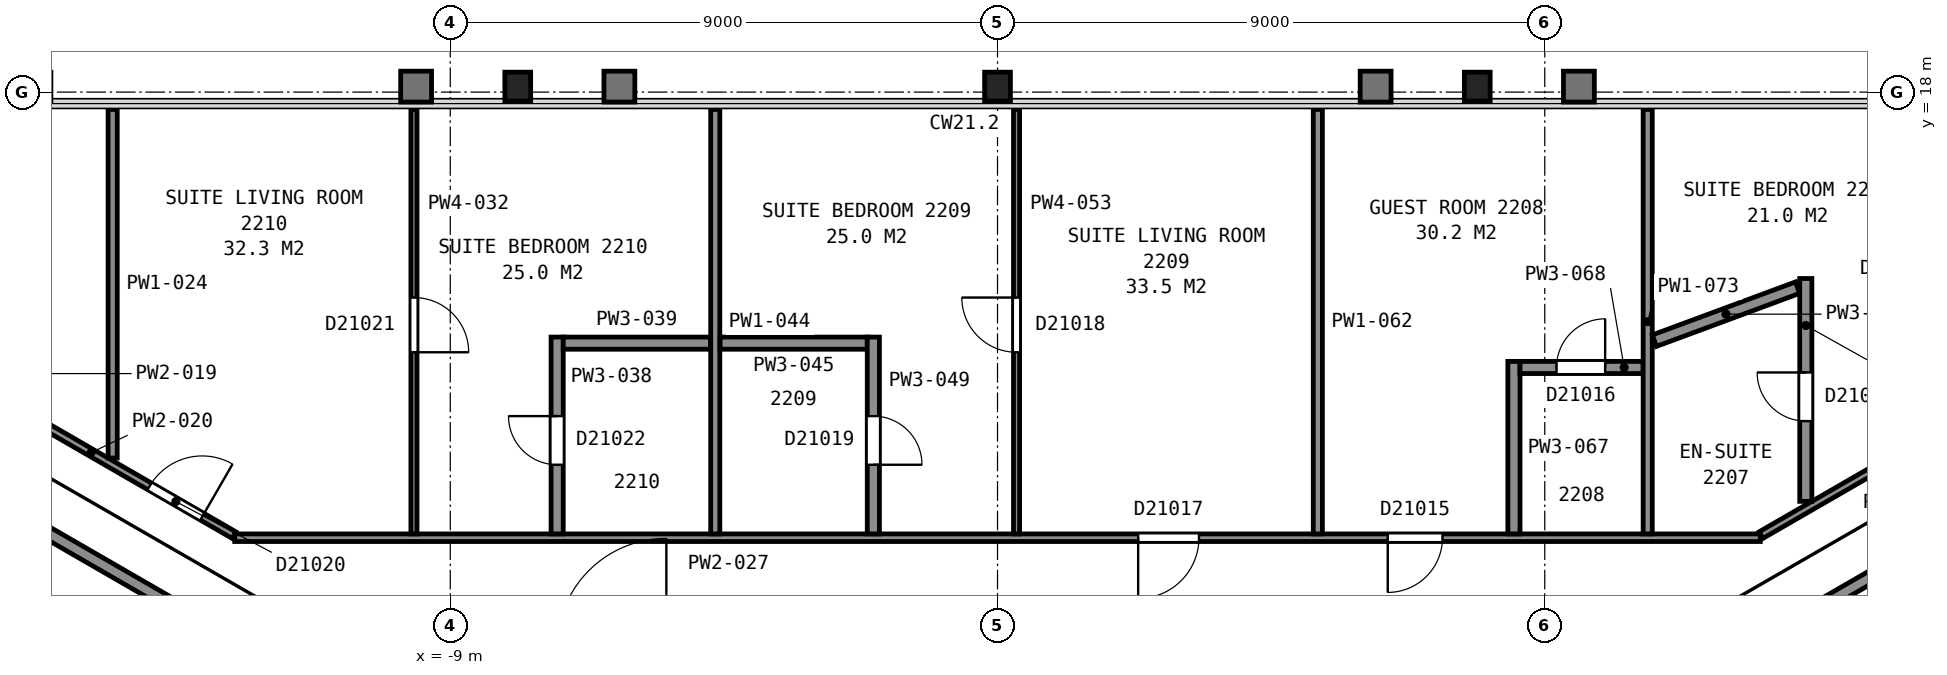
"""IFC4 building model, lengths in metres.
Left out: names, types, materials, properties, quantities, classifications, styles, units other than length and angle.
Written with IfcOpenShell. Run it as: python <this file> out.ifc"""

import sys

from ifc_helpers import new_model, si_unit, direction, frame, frame_2d, origin, origin_2d, place, context, subcontext, project, spatial, rectangle, i_section, extrude, element, fill, save


model = new_model("IFC4")
c1 = context("Model", 3, precision=1e-05, world=origin(), true_north=direction((0.0, 1.0)))
c2 = subcontext(c1, "Body", "Model", "MODEL_VIEW")
j1 = project(units=[si_unit("LENGTHUNIT", "METRE"), si_unit("PLANEANGLEUNIT", "RADIAN")], contexts=[c1])
p1 = place(None, origin())
s1 = spatial("IfcSite", under=j1, at=p1, CompositionType="ELEMENT")
p2 = place(p1, origin())
s2 = spatial("IfcBuilding", under=s1, at=p2, CompositionType="ELEMENT")
p3 = place(p2, frame((0.0, 0.0, 96.4)))
s3 = spatial("IfcBuildingStorey", under=s2, at=p3, CompositionType="ELEMENT", Elevation=96.4)
p4 = place(p3, frame((7.89, 18.09, 0.0), z_axis=(0.0, 0.0, 1.0), x_axis=(1.0, 0.0, 0.0)))
e1 = element("IfcColumn", 1, at=p4, inside=s3, PredefinedType="COLUMN", context=c2, shape_type="SweptSolid", body=[
    extrude(i_section(OverallWidth=0.424, OverallDepth=0.475, WebThickness=0.048, FlangeThickness=0.077, FilletRadius=0.015, at=origin_2d()), origin(), (0.0, 0.0, 1.0), 3.56),
])
p5 = place(p3, frame((0.0, 18.09, 0.0), z_axis=(0.0, 0.0, 1.0), x_axis=(1.0, 0.0, 0.0)))
e2 = element("IfcColumn", 2, at=p5, inside=s3, PredefinedType="COLUMN", context=c2, shape_type="SweptSolid", body=[
    extrude(i_section(OverallWidth=0.424, OverallDepth=0.475, WebThickness=0.048, FlangeThickness=0.077, FilletRadius=0.015, at=origin_2d()), origin(), (0.0, 0.0, 1.0), 3.565),
])
p6 = place(p3, frame((-7.89, 18.09, 0.0), z_axis=(0.0, 0.0, 1.0), x_axis=(1.0, 0.0, 0.0)))
e3 = element("IfcColumn", 3, at=p6, inside=s3, PredefinedType="COLUMN", context=c2, shape_type="SweptSolid", body=[
    extrude(i_section(OverallWidth=0.424, OverallDepth=0.475, WebThickness=0.048, FlangeThickness=0.077, FilletRadius=0.015, at=origin_2d()), origin(), (0.0, 0.0, 1.0), 3.56),
])
for number, where, z_axis, x_axis in (
    (4, (6.178, 5.299, 0.0), (0.0, 0.0, 1.0), (0.866, 0.5, 0.0)),
    (5, (-6.178, 5.299, 0.0), (0.0, 0.0, 1.0), (-0.866, 0.5, 0.0)),
):
    element("IfcWall", number, at=place(p3, frame(where, z_axis=z_axis, x_axis=x_axis)), inside=s3, PredefinedType="PARTITIONING", context=c2, shape_type="SweptSolid", body=[
        extrude(rectangle(XDim=12.0, YDim=0.2, at=frame_2d((6.0, 0.0))), origin(), (0.0, 0.0, 1.0), 3.35),
    ])
p7 = place(p3, frame((-15.867, 12.625, 0.0), z_axis=(0.0, 0.0, 1.0), x_axis=(0.86603035395, -0.499991425964, 0.0)))
e6 = element("IfcWall", 6, at=p7, inside=s3, PredefinedType="PARTITIONING", context=c2, shape_type="SweptSolid", body=[
    extrude(rectangle(XDim=3.824, YDim=0.125, at=frame_2d((1.912, 0.0))), origin(), (0.0, 0.0, 1.0), 2.613),
])
p8 = place(p7, frame((2.219, 0.0, 0.0)))
e7 = element("IfcOpeningElement", 7, at=p8, cuts=e6, PredefinedType="OPENING", context=c2, shape_type="SweptSolid", body=[
    extrude(rectangle(XDim=1.0, YDim=2.1, at=frame_2d((0.5, 1.05))), frame((0.0, 0.073, 0.0), z_axis=(0.0, -1.0, 0.0), x_axis=(1.0, 0.0, 0.0)), (0.0, 0.0, 1.0), 0.145),
])
p9 = place(p3, frame((-14.552, 11.981, 0.0), z_axis=(0.0, 0.0, 1.0), x_axis=(0.0, 1.0, 0.0)))
e8 = element("IfcWall", 8, at=p9, inside=s3, PredefinedType="PARTITIONING", context=c2, shape_type="SweptSolid", body=[
    extrude(rectangle(XDim=5.734, YDim=0.15, at=frame_2d((2.867, 0.0))), origin(), (0.0, 0.0, 1.0), 2.613),
])
p10 = place(p3, frame((-12.544, 10.671, 0.0), z_axis=(0.0, 0.0, 1.0), x_axis=(1.0, 0.0, 0.0)))
e9 = element("IfcWall", 9, at=p10, inside=s3, PredefinedType="PARTITIONING", context=c2, shape_type="SweptSolid", body=[
    extrude(rectangle(XDim=25.089, YDim=0.125, at=frame_2d((12.544, 0.0))), origin(), (0.0, 0.0, 1.0), 2.613),
])
p11 = place(p10, frame((18.962, 0.0, 0.0)))
e10 = element("IfcOpeningElement", 10, at=p11, cuts=e9, PredefinedType="OPENING", context=c2, shape_type="SweptSolid", body=[
    extrude(rectangle(XDim=0.9, YDim=2.1, at=frame_2d((0.45, 1.05))), frame((0.0, 0.073, 0.0), z_axis=(0.0, -1.0, 0.0), x_axis=(1.0, 0.0, 0.0)), (0.0, 0.0, 1.0), 0.145),
])
p12 = place(p10, frame((14.857, 0.0, 0.0)))
e11 = element("IfcOpeningElement", 11, at=p12, cuts=e9, PredefinedType="OPENING", context=c2, shape_type="SweptSolid", body=[
    extrude(rectangle(XDim=1.0, YDim=2.1, at=frame_2d((0.5, 1.05))), frame((0.0, 0.073, 0.0), z_axis=(0.0, -1.0, 0.0), x_axis=(1.0, 0.0, 0.0)), (0.0, 0.0, 1.0), 0.145),
])
p13 = place(p3, frame((-9.597, 17.715, 0.0), z_axis=(0.0, 0.0, 1.0), x_axis=(0.0, -1.0, 0.0)))
e12 = element("IfcWall", 12, at=p13, inside=s3, PredefinedType="PARTITIONING", context=c2, shape_type="SweptSolid", body=[
    extrude(rectangle(XDim=6.982, YDim=0.1, at=frame_2d((3.491, 0.0))), origin(), (0.0, 0.0, 1.0), 2.613),
])
p14 = place(p13, frame((3.094, 0.0, 0.0)))
e13 = element("IfcOpeningElement", 13, at=p14, cuts=e12, PredefinedType="OPENING", context=c2, shape_type="SweptSolid", body=[
    extrude(rectangle(XDim=0.9, YDim=2.1, at=frame_2d((0.45, 1.05))), frame((0.0, 0.06, 0.0), z_axis=(0.0, -1.0, 0.0), x_axis=(1.0, 0.0, 0.0)), (0.0, 0.0, 1.0), 0.12),
])
p15 = place(p3, frame((-7.242, 13.971, 0.0), z_axis=(0.0, 0.0, 1.0), x_axis=(0.0, -1.0, 0.0)))
e14 = element("IfcWall", 14, at=p15, inside=s3, PredefinedType="PARTITIONING", context=c2, shape_type="SweptSolid", body=[
    extrude(rectangle(XDim=3.238, YDim=0.2, at=frame_2d((1.619, 0.0))), origin(), (0.0, 0.0, 1.0), 2.613),
])
p16 = place(p15, frame((1.3, 0.0, 0.0)))
e15 = element("IfcOpeningElement", 15, at=p16, cuts=e14, PredefinedType="OPENING", context=c2, shape_type="SweptSolid", body=[
    extrude(rectangle(XDim=0.8, YDim=2.1, at=frame_2d((0.4, 1.05))), frame((0.0, 0.11, 0.0), z_axis=(0.0, -1.0, 0.0), x_axis=(1.0, 0.0, 0.0)), (0.0, 0.0, 1.0), 0.22),
])
p17 = place(p3, frame((-7.142, 13.871, 0.0), z_axis=(0.0, 0.0, 1.0), x_axis=(1.0, 0.0, 0.0)))
e16 = element("IfcWall", 16, at=p17, inside=s3, PredefinedType="PARTITIONING", context=c2, shape_type="SweptSolid", body=[
    extrude(rectangle(XDim=2.42, YDim=0.2, at=frame_2d((1.21, 0.0))), origin(), (0.0, 0.0, 1.0), 2.613),
])
p18 = place(p3, frame((-4.642, 10.733, 0.0), z_axis=(0.0, 0.0, 1.0), x_axis=(0.0, 1.0, 0.0)))
e17 = element("IfcWall", 17, at=p18, inside=s3, PredefinedType="PARTITIONING", context=c2, shape_type="SweptSolid", body=[
    extrude(rectangle(XDim=6.982, YDim=0.15, at=frame_2d((3.491, 0.0))), origin(), (0.0, 0.0, 1.0), 2.613),
])
p19 = place(p3, frame((-4.562, 13.871, 0.0), z_axis=(0.0, 0.0, 1.0), x_axis=(1.0, 0.0, 0.0)))
e18 = element("IfcWall", 18, at=p19, inside=s3, PredefinedType="PARTITIONING", context=c2, shape_type="SweptSolid", body=[
    extrude(rectangle(XDim=2.42, YDim=0.2, at=frame_2d((1.21, 0.0))), origin(), (0.0, 0.0, 1.0), 2.613),
])
p20 = place(p3, frame((-2.042, 10.733, 0.0), z_axis=(0.0, 0.0, 1.0), x_axis=(0.0, 1.0, 0.0)))
e19 = element("IfcWall", 19, at=p20, inside=s3, PredefinedType="PARTITIONING", context=c2, shape_type="SweptSolid", body=[
    extrude(rectangle(XDim=3.238, YDim=0.2, at=frame_2d((1.619, 0.0))), origin(), (0.0, 0.0, 1.0), 2.613),
])
p21 = place(p20, frame((1.137, 0.0, 0.0)))
e20 = element("IfcOpeningElement", 20, at=p21, cuts=e19, PredefinedType="OPENING", context=c2, shape_type="SweptSolid", body=[
    extrude(rectangle(XDim=0.8, YDim=2.1, at=frame_2d((0.4, 1.05))), frame((0.0, 0.11, 0.0), z_axis=(0.0, -1.0, 0.0), x_axis=(1.0, 0.0, 0.0)), (0.0, 0.0, 1.0), 0.22),
])
p22 = place(p3, frame((0.313, 10.733, 0.0), z_axis=(0.0, 0.0, 1.0), x_axis=(0.0, 1.0, 0.0)))
e21 = element("IfcWall", 21, at=p22, inside=s3, PredefinedType="PARTITIONING", context=c2, shape_type="SweptSolid", body=[
    extrude(rectangle(XDim=6.982, YDim=0.1, at=frame_2d((3.491, 0.0))), origin(), (0.0, 0.0, 1.0), 2.613),
])
p23 = place(p22, frame((2.988, 0.0, 0.0)))
e22 = element("IfcOpeningElement", 22, at=p23, cuts=e21, PredefinedType="OPENING", context=c2, shape_type="SweptSolid", body=[
    extrude(rectangle(XDim=0.9, YDim=2.1, at=frame_2d((0.45, 1.05))), frame((0.0, 0.06, 0.0), z_axis=(0.0, -1.0, 0.0), x_axis=(1.0, 0.0, 0.0)), (0.0, 0.0, 1.0), 0.12),
])
p24 = place(p3, frame((5.268, 10.733, 0.0), z_axis=(0.0, 0.0, 1.0), x_axis=(0.0, 1.0, 0.0)))
e23 = element("IfcWall", 23, at=p24, inside=s3, PredefinedType="PARTITIONING", context=c2, shape_type="SweptSolid", body=[
    extrude(rectangle(XDim=6.982, YDim=0.15, at=frame_2d((3.491, 0.0))), origin(), (0.0, 0.0, 1.0), 2.613),
])
p25 = place(p3, frame((8.493, 10.733, 0.0), z_axis=(0.0, 0.0, 1.0), x_axis=(0.0, 1.0, 0.0)))
e24 = element("IfcWall", 24, at=p25, inside=s3, PredefinedType="PARTITIONING", context=c2, shape_type="SweptSolid", body=[
    extrude(rectangle(XDim=2.838, YDim=0.2, at=frame_2d((1.419, 0.0))), origin(), (0.0, 0.0, 1.0), 2.613),
])
p26 = place(p3, frame((10.618, 13.471, 0.0), z_axis=(0.0, 0.0, 1.0), x_axis=(-1.0, 0.0, 0.0)))
e25 = element("IfcWall", 25, at=p26, inside=s3, PredefinedType="PARTITIONING", context=c2, shape_type="SweptSolid", body=[
    extrude(rectangle(XDim=2.025, YDim=0.2, at=frame_2d((1.012, 0.0))), origin(), (0.0, 0.0, 1.0), 2.613),
])
p27 = place(p26, frame((0.625, 0.0, 0.0)))
e26 = element("IfcOpeningElement", 26, at=p27, cuts=e25, PredefinedType="OPENING", context=c2, shape_type="SweptSolid", body=[
    extrude(rectangle(XDim=0.8, YDim=2.1, at=frame_2d((0.4, 1.05))), frame((0.0, 0.11, 0.0), z_axis=(0.0, -1.0, 0.0), x_axis=(1.0, 0.0, 0.0)), (0.0, 0.0, 1.0), 0.22),
])
p28 = place(p3, frame((10.693, 10.733, 0.0), z_axis=(0.0, 0.0, 1.0), x_axis=(0.0, 1.0, 0.0)))
e27 = element("IfcWall", 27, at=p28, inside=s3, PredefinedType="PARTITIONING", context=c2, shape_type="SweptSolid", body=[
    extrude(rectangle(XDim=6.982, YDim=0.15, at=frame_2d((3.491, 0.0))), origin(), (0.0, 0.0, 1.0), 2.613),
])
p29 = place(p3, frame((10.803, 13.912, 0.0), z_axis=(0.0, 0.0, 1.0), x_axis=(0.937732337139, 0.347358696283, 0.0)))
e28 = element("IfcWall", 28, at=p29, inside=s3, PredefinedType="PARTITIONING", context=c2, shape_type="SweptSolid", body=[
    extrude(rectangle(XDim=2.51, YDim=0.2, at=frame_2d((1.255, 0.0))), origin(), (0.0, 0.0, 1.0), 2.613),
])
p30 = place(p3, frame((12.556, 10.713, 0.0), z_axis=(0.0, 0.0, 1.0), x_axis=(0.86603035395, 0.499991425964, 0.0)))
e29 = element("IfcWall", 29, at=p30, inside=s3, PredefinedType="PARTITIONING", context=c2, shape_type="SweptSolid", body=[
    extrude(rectangle(XDim=3.824, YDim=0.125, at=frame_2d((1.912, 0.0))), origin(), (0.0, 0.0, 1.0), 2.613),
])
p31 = place(p3, frame((13.293, 11.269, 0.0), z_axis=(0.0, 0.0, 1.0), x_axis=(0.0, 1.0, 0.0)))
e30 = element("IfcWall", 30, at=p31, inside=s3, PredefinedType="PARTITIONING", context=c2, shape_type="SweptSolid", body=[
    extrude(rectangle(XDim=3.665, YDim=0.2, at=frame_2d((1.833, 0.0))), origin(), (0.0, 0.0, 1.0), 2.613),
])
p32 = place(p31, frame((1.32, 0.0, 0.0)))
e31 = element("IfcOpeningElement", 31, at=p32, cuts=e30, PredefinedType="OPENING", context=c2, shape_type="SweptSolid", body=[
    extrude(rectangle(XDim=0.8, YDim=2.1, at=frame_2d((0.4, 1.05))), frame((0.0, 0.11, 0.0), z_axis=(0.0, -1.0, 0.0), x_axis=(1.0, 0.0, 0.0)), (0.0, 0.0, 1.0), 0.22),
])
p33 = place(p8, origin())
e32 = element("IfcDoor", 32, at=p33, inside=s3, OperationType="SINGLE_SWING_RIGHT", PredefinedType="DOOR", context=c2, shape_type="SweptSolid", body=[
    extrude(rectangle(XDim=1.0, YDim=2.1, at=frame_2d((0.5, 1.05))), frame((0.0, 0.025, 0.0), z_axis=(0.0, -1.0, 0.0), x_axis=(1.0, 0.0, 0.0)), (0.0, 0.0, 1.0), 0.05),
])
fill(e7, e32)
p34 = place(p11, origin())
e33 = element("IfcDoor", 33, at=p34, inside=s3, OperationType="SINGLE_SWING_LEFT", PredefinedType="DOOR", context=c2, shape_type="SweptSolid", body=[
    extrude(rectangle(XDim=0.9, YDim=2.1, at=frame_2d((0.45, 1.05))), frame((0.0, 0.025, 0.0), z_axis=(0.0, -1.0, 0.0), x_axis=(1.0, 0.0, 0.0)), (0.0, 0.0, 1.0), 0.05),
])
fill(e10, e33)
p35 = place(p12, origin())
e34 = element("IfcDoor", 34, at=p35, inside=s3, OperationType="SINGLE_SWING_LEFT", PredefinedType="DOOR", context=c2, shape_type="SweptSolid", body=[
    extrude(rectangle(XDim=1.0, YDim=2.1, at=frame_2d((0.5, 1.05))), frame((0.0, 0.025, 0.0), z_axis=(0.0, -1.0, 0.0), x_axis=(1.0, 0.0, 0.0)), (0.0, 0.0, 1.0), 0.05),
])
fill(e11, e34)
p36 = place(p14, origin())
e35 = element("IfcDoor", 35, at=p36, inside=s3, OperationType="SINGLE_SWING_RIGHT", PredefinedType="DOOR", context=c2, shape_type="SweptSolid", body=[
    extrude(rectangle(XDim=0.9, YDim=2.1, at=frame_2d((0.45, 1.05))), frame((0.0, 0.025, 0.0), z_axis=(0.0, -1.0, 0.0), x_axis=(1.0, 0.0, 0.0)), (0.0, 0.0, 1.0), 0.05),
])
fill(e13, e35)
p37 = place(p16, origin())
e36 = element("IfcDoor", 36, at=p37, inside=s3, OperationType="SINGLE_SWING_LEFT", PredefinedType="DOOR", context=c2, shape_type="SweptSolid", body=[
    extrude(rectangle(XDim=0.8, YDim=2.1, at=frame_2d((0.4, 1.05))), frame((0.0, 0.025, 0.0), z_axis=(0.0, -1.0, 0.0), x_axis=(1.0, 0.0, 0.0)), (0.0, 0.0, 1.0), 0.05),
])
fill(e15, e36)
p38 = place(p21, origin())
e37 = element("IfcDoor", 37, at=p38, inside=s3, OperationType="SINGLE_SWING_LEFT", PredefinedType="DOOR", context=c2, shape_type="SweptSolid", body=[
    extrude(rectangle(XDim=0.8, YDim=2.1, at=frame_2d((0.4, 1.05))), frame((0.0, 0.025, 0.0), z_axis=(0.0, -1.0, 0.0), x_axis=(1.0, 0.0, 0.0)), (0.0, 0.0, 1.0), 0.05),
])
fill(e20, e37)
p39 = place(p23, origin())
e38 = element("IfcDoor", 38, at=p39, inside=s3, OperationType="SINGLE_SWING_RIGHT", PredefinedType="DOOR", context=c2, shape_type="SweptSolid", body=[
    extrude(rectangle(XDim=0.9, YDim=2.1, at=frame_2d((0.45, 1.05))), frame((0.0, 0.025, 0.0), z_axis=(0.0, -1.0, 0.0), x_axis=(1.0, 0.0, 0.0)), (0.0, 0.0, 1.0), 0.05),
])
fill(e22, e38)
p40 = place(p27, origin())
e39 = element("IfcDoor", 39, at=p40, inside=s3, OperationType="SINGLE_SWING_LEFT", PredefinedType="DOOR", context=c2, shape_type="SweptSolid", body=[
    extrude(rectangle(XDim=0.8, YDim=2.1, at=frame_2d((0.4, 1.05))), frame((0.0, 0.025, 0.0), z_axis=(0.0, -1.0, 0.0), x_axis=(1.0, 0.0, 0.0)), (0.0, 0.0, 1.0), 0.05),
])
fill(e26, e39)
p41 = place(p32, origin())
e40 = element("IfcDoor", 40, at=p41, inside=s3, OperationType="SINGLE_SWING_RIGHT", PredefinedType="DOOR", context=c2, shape_type="SweptSolid", body=[
    extrude(rectangle(XDim=0.8, YDim=2.1, at=frame_2d((0.4, 1.05))), frame((0.0, 0.025, 0.0), z_axis=(0.0, -1.0, 0.0), x_axis=(1.0, 0.0, 0.0)), (0.0, 0.0, 1.0), 0.05),
])
fill(e31, e40)
save(model, sys.argv[1])
